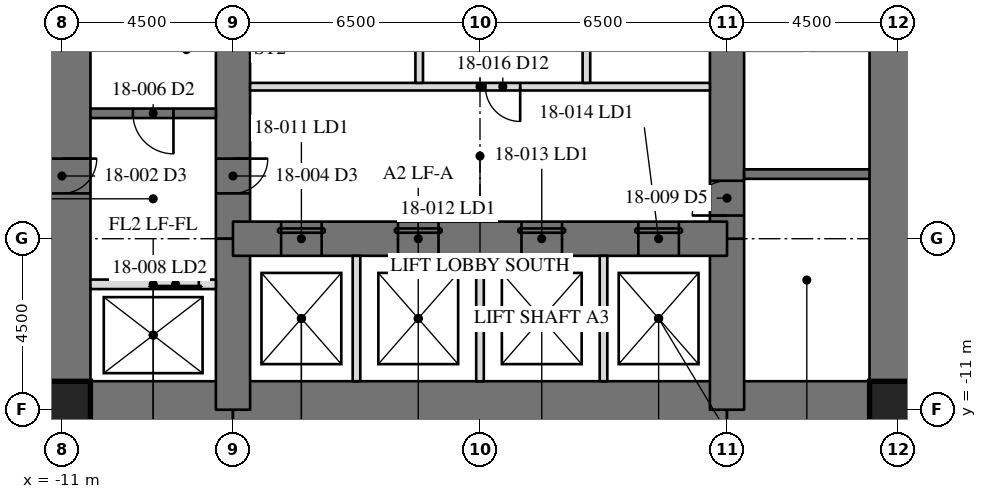
"""IFC4 building model, lengths in metres.
Left out: names, types, materials, properties, quantities, classifications, styles, units other than length and angle.
Written with IfcOpenShell. Run it as: python <this file> out.ifc"""

import sys

from ifc_helpers import new_model, si_unit, direction, frame, frame_2d, origin, origin_2d, place, context, subcontext, project, spatial, rectangle, hollow_rectangle, extrude, element, fill, save


model = new_model("IFC4")
c1 = context("Model", 3, precision=1e-05, world=origin(), true_north=direction((0.0, 1.0)))
c2 = subcontext(c1, "Body", "Model", "MODEL_VIEW")
j1 = project(units=[si_unit("LENGTHUNIT", "METRE"), si_unit("PLANEANGLEUNIT", "RADIAN")], contexts=[c1])
p1 = place(None, origin())
s1 = spatial("IfcSite", under=j1, at=p1, CompositionType="ELEMENT")
p2 = place(p1, origin())
s2 = spatial("IfcBuilding", under=s1, at=p2, CompositionType="ELEMENT")
p3 = place(p2, frame((0.0, 0.0, 77.5)))
s3 = spatial("IfcBuildingStorey", under=s2, at=p3, CompositionType="ELEMENT", Elevation=77.5)
p4 = place(p3, frame((11.0, -11.0, 0.0), z_axis=(0.0, 0.0, 1.0), x_axis=(0.0, 1.0, 0.0)))
e1 = element("IfcWall", 1, at=p4, inside=s3, PredefinedType="SHEAR", context=c2, shape_type="SweptSolid", body=[
    extrude(rectangle(XDim=22.0, YDim=1.5, at=frame_2d((11.0, 0.0))), origin(), (0.0, 0.0, 1.0), 4.1),
])
p5 = place(p4, frame((15.393, 0.0, 0.0)))
e2 = element("IfcOpeningElement", 2, at=p5, cuts=e1, PredefinedType="OPENING", context=c2, shape_type="SweptSolid", body=[
    extrude(rectangle(XDim=0.915, YDim=2.134, at=frame_2d((0.458, 1.067))), frame((0.0, 0.76, 0.0), z_axis=(0.0, -1.0, 0.0), x_axis=(1.0, 0.0, 0.0)), (0.0, 0.0, 1.0), 1.52),
])
p6 = place(p3, frame((-11.0, 11.0, 0.0), z_axis=(0.0, 0.0, 1.0), x_axis=(0.0, -1.0, 0.0)))
e3 = element("IfcWall", 3, at=p6, inside=s3, PredefinedType="SHEAR", context=c2, shape_type="SweptSolid", body=[
    extrude(rectangle(XDim=22.0, YDim=1.5, at=frame_2d((11.0, 0.0))), origin(), (0.0, 0.0, 1.0), 4.1),
])
p7 = place(p6, frame((15.393, 0.0, 0.0)))
e4 = element("IfcOpeningElement", 4, at=p7, cuts=e3, PredefinedType="OPENING", context=c2, shape_type="SweptSolid", body=[
    extrude(rectangle(XDim=0.915, YDim=2.134, at=frame_2d((0.458, 1.067))), frame((0.0, 0.76, 0.0), z_axis=(0.0, -1.0, 0.0), x_axis=(1.0, 0.0, 0.0)), (0.0, 0.0, 1.0), 1.52),
])
p8 = place(p3, frame((-11.0, -11.0, 0.0), z_axis=(0.0, 0.0, 1.0), x_axis=(1.0, 0.0, 0.0)))
e5 = element("IfcWall", 5, at=p8, inside=s3, PredefinedType="SHEAR", context=c2, shape_type="SweptSolid", body=[
    extrude(rectangle(XDim=4.5, YDim=1.5, at=frame_2d((2.25, 0.0))), origin(), (0.0, 0.0, 1.0), 4.1),
])
p9 = place(p3, frame((-6.5, -11.0, 0.0), z_axis=(0.0, 0.0, 1.0), x_axis=(1.0, 0.0, 0.0)))
e6 = element("IfcWall", 6, at=p9, inside=s3, PredefinedType="SHEAR", context=c2, shape_type="SweptSolid", body=[
    extrude(rectangle(XDim=13.0, YDim=1.5, at=frame_2d((6.5, 0.0))), origin(), (0.0, 0.0, 1.0), 4.1),
])
p10 = place(p3, frame((6.5, -11.0, 0.0), z_axis=(0.0, 0.0, 1.0), x_axis=(1.0, 0.0, 0.0)))
e7 = element("IfcWall", 7, at=p10, inside=s3, PredefinedType="SHEAR", context=c2, shape_type="SweptSolid", body=[
    extrude(rectangle(XDim=4.5, YDim=1.5, at=frame_2d((2.25, 0.0))), origin(), (0.0, 0.0, 1.0), 4.1),
])
p11 = place(p3, frame((6.5, -11.0, 0.0), z_axis=(0.0, 0.0, 1.0), x_axis=(0.0, 1.0, 0.0)))
e8 = element("IfcWall", 8, at=p11, inside=s3, PredefinedType="SHEAR", context=c2, shape_type="SweptSolid", body=[
    extrude(rectangle(XDim=4.5, YDim=0.9, at=frame_2d((2.25, 0.0))), origin(), (0.0, 0.0, 1.0), 4.1),
])
p12 = place(p3, frame((6.5, -6.5, 0.0), z_axis=(0.0, 0.0, 1.0), x_axis=(0.0, 1.0, 0.0)))
e9 = element("IfcWall", 9, at=p12, inside=s3, PredefinedType="SHEAR", context=c2, shape_type="SweptSolid", body=[
    extrude(rectangle(XDim=13.0, YDim=0.9, at=frame_2d((6.5, 0.0))), origin(), (0.0, 0.0, 1.0), 4.1),
])
p13 = place(p12, frame((10.893, 0.0, 0.0)))
e10 = element("IfcOpeningElement", 10, at=p13, cuts=e9, PredefinedType="OPENING", context=c2, shape_type="SweptSolid", body=[
    extrude(rectangle(XDim=0.915, YDim=2.134, at=frame_2d((0.458, 1.067))), frame((0.0, 0.46, 0.0), z_axis=(0.0, -1.0, 0.0), x_axis=(1.0, 0.0, 0.0)), (0.0, 0.0, 1.0), 0.92),
])
p14 = place(p12, frame((0.61, 0.0, 0.0)))
e11 = element("IfcOpeningElement", 11, at=p14, cuts=e9, PredefinedType="OPENING", context=c2, shape_type="SweptSolid", body=[
    extrude(rectangle(XDim=0.915, YDim=2.134, at=frame_2d((0.458, 1.067))), frame((0.0, 0.46, 0.0), z_axis=(0.0, -1.0, 0.0), x_axis=(1.0, 0.0, 0.0)), (0.0, 0.0, 1.0), 0.92),
])
p15 = place(p3, frame((-6.5, 6.5, 0.0), z_axis=(0.0, 0.0, 1.0), x_axis=(0.0, -1.0, 0.0)))
e12 = element("IfcWall", 12, at=p15, inside=s3, PredefinedType="SHEAR", context=c2, shape_type="SweptSolid", body=[
    extrude(rectangle(XDim=13.0, YDim=0.9, at=frame_2d((6.5, 0.0))), origin(), (0.0, 0.0, 1.0), 4.1),
])
p16 = place(p15, frame((10.893, 0.0, 0.0)))
e13 = element("IfcOpeningElement", 13, at=p16, cuts=e12, PredefinedType="OPENING", context=c2, shape_type="SweptSolid", body=[
    extrude(rectangle(XDim=0.915, YDim=2.134, at=frame_2d((0.458, 1.067))), frame((0.0, 0.46, 0.0), z_axis=(0.0, -1.0, 0.0), x_axis=(1.0, 0.0, 0.0)), (0.0, 0.0, 1.0), 0.92),
])
p17 = place(p15, frame((0.61, 0.0, 0.0)))
e14 = element("IfcOpeningElement", 14, at=p17, cuts=e12, PredefinedType="OPENING", context=c2, shape_type="SweptSolid", body=[
    extrude(rectangle(XDim=0.915, YDim=2.134, at=frame_2d((0.458, 1.067))), frame((0.0, 0.46, 0.0), z_axis=(0.0, -1.0, 0.0), x_axis=(1.0, 0.0, 0.0)), (0.0, 0.0, 1.0), 0.92),
])
p18 = place(p3, frame((-6.5, -6.5, 0.0), z_axis=(0.0, 0.0, 1.0), x_axis=(0.0, -1.0, 0.0)))
e15 = element("IfcWall", 15, at=p18, inside=s3, PredefinedType="SHEAR", context=c2, shape_type="SweptSolid", body=[
    extrude(rectangle(XDim=4.5, YDim=0.9, at=frame_2d((2.25, 0.0))), origin(), (0.0, 0.0, 1.0), 4.1),
])
p19 = place(p3, frame((-6.5, -6.5, 0.0), z_axis=(0.0, 0.0, 1.0), x_axis=(1.0, 0.0, 0.0)))
e16 = element("IfcWall", 16, at=p19, inside=s3, PredefinedType="SHEAR", context=c2, shape_type="SweptSolid", body=[
    extrude(rectangle(XDim=13.0, YDim=0.9, at=frame_2d((6.5, 0.0))), origin(), (0.0, 0.0, 1.0), 4.1),
])
p20 = place(p19, frame((1.267, 0.0, 0.0)))
e17 = element("IfcOpeningElement", 17, at=p20, cuts=e16, PredefinedType="OPENING", context=c2, shape_type="SweptSolid", body=[
    extrude(rectangle(XDim=1.067, YDim=2.134, at=frame_2d((0.533, 1.067))), frame((0.0, 0.46, 0.0), z_axis=(0.0, -1.0, 0.0), x_axis=(1.0, 0.0, 0.0)), (0.0, 0.0, 1.0), 0.92),
])
p21 = place(p19, frame((4.342, 0.0, 0.0)))
e18 = element("IfcOpeningElement", 18, at=p21, cuts=e16, PredefinedType="OPENING", context=c2, shape_type="SweptSolid", body=[
    extrude(rectangle(XDim=1.067, YDim=2.134, at=frame_2d((0.533, 1.067))), frame((0.0, 0.46, 0.0), z_axis=(0.0, -1.0, 0.0), x_axis=(1.0, 0.0, 0.0)), (0.0, 0.0, 1.0), 0.92),
])
p22 = place(p19, frame((7.592, 0.0, 0.0)))
e19 = element("IfcOpeningElement", 19, at=p22, cuts=e16, PredefinedType="OPENING", context=c2, shape_type="SweptSolid", body=[
    extrude(rectangle(XDim=1.067, YDim=2.134, at=frame_2d((0.533, 1.067))), frame((0.0, 0.46, 0.0), z_axis=(0.0, -1.0, 0.0), x_axis=(1.0, 0.0, 0.0)), (0.0, 0.0, 1.0), 0.92),
])
p23 = place(p19, frame((10.667, 0.0, 0.0)))
e20 = element("IfcOpeningElement", 20, at=p23, cuts=e16, PredefinedType="OPENING", context=c2, shape_type="SweptSolid", body=[
    extrude(rectangle(XDim=1.067, YDim=2.134, at=frame_2d((0.533, 1.067))), frame((0.0, 0.46, 0.0), z_axis=(0.0, -1.0, 0.0), x_axis=(1.0, 0.0, 0.0)), (0.0, 0.0, 1.0), 0.92),
])
for number, where, z_axis, x_axis in (
    (21, (-11.0, -11.0, 0.0), (0.0, 0.0, 1.0), (1.0, 0.0, 0.0)),
    (22, (11.0, -11.0, 0.0), (0.0, 0.0, 1.0), (1.0, 0.0, 0.0)),
):
    element("IfcColumn", number, at=place(p3, frame(where, z_axis=z_axis, x_axis=x_axis)), inside=s3, PredefinedType="COLUMN", context=c2, shape_type="SweptSolid", body=[
        extrude(hollow_rectangle(XDim=1.499, YDim=1.499, WallThickness=0.102, at=origin_2d()), origin(), (0.0, 0.0, 1.0), 4.1),
    ])
p24 = place(p3, frame((6.95, -4.8, 0.0), z_axis=(0.0, 0.0, 1.0), x_axis=(1.0, 0.0, 0.0)))
e23 = element("IfcWall", 23, at=p24, inside=s3, PredefinedType="SOLIDWALL", context=c2, shape_type="SweptSolid", body=[
    extrude(rectangle(XDim=3.3, YDim=0.25, at=frame_2d((1.65, 0.0))), origin(), (0.0, 0.0, 1.0), 3.91),
])
p25 = place(p3, frame((-6.95, -3.2, 0.0), z_axis=(0.0, 0.0, 1.0), x_axis=(-1.0, 0.0, 0.0)))
e24 = element("IfcWall", 24, at=p25, inside=s3, PredefinedType="SOLIDWALL", context=c2, shape_type="SweptSolid", body=[
    extrude(rectangle(XDim=3.3, YDim=0.25, at=frame_2d((1.65, 0.0))), origin(), (0.0, 0.0, 1.0), 3.91),
])
p26 = place(p25, frame((1.116, 0.0, 0.0)))
e25 = element("IfcOpeningElement", 25, at=p26, cuts=e24, PredefinedType="OPENING", context=c2, shape_type="SweptSolid", body=[
    extrude(rectangle(XDim=1.067, YDim=2.134, at=frame_2d((0.533, 1.067))), frame((0.0, 0.135, 0.0), z_axis=(0.0, -1.0, 0.0), x_axis=(1.0, 0.0, 0.0)), (0.0, 0.0, 1.0), 0.27),
])
p27 = place(p3, frame((-6.95, -7.7, 0.0), z_axis=(0.0, 0.0, 1.0), x_axis=(-1.0, 0.0, 0.0)))
e26 = element("IfcWall", 26, at=p27, inside=s3, PredefinedType="PARTITIONING", context=c2, shape_type="SweptSolid", body=[
    extrude(rectangle(XDim=3.3, YDim=0.25, at=frame_2d((1.65, 0.0))), origin(), (0.0, 0.0, 1.0), 3.91),
])
p28 = place(p27, frame((0.45, 0.0, 0.0)))
e27 = element("IfcOpeningElement", 27, at=p28, cuts=e26, PredefinedType="OPENING", context=c2, shape_type="SweptSolid", body=[
    extrude(rectangle(XDim=1.219, YDim=2.134, at=frame_2d((0.609, 1.067))), frame((0.0, 0.135, 0.0), z_axis=(0.0, -1.0, 0.0), x_axis=(1.0, 0.0, 0.0)), (0.0, 0.0, 1.0), 0.27),
])
p29 = place(p3, frame((6.05, -2.5, 0.0), z_axis=(0.0, 0.0, 1.0), x_axis=(-1.0, 0.0, 0.0)))
e28 = element("IfcWall", 28, at=p29, inside=s3, PredefinedType="PARTITIONING", context=c2, shape_type="SweptSolid", body=[
    extrude(rectangle(XDim=12.1, YDim=0.2, at=frame_2d((6.05, 0.0))), origin(), (0.0, 0.0, 1.0), 3.91),
])
p30 = place(p29, frame((4.992, 0.0, 0.0)))
e29 = element("IfcOpeningElement", 29, at=p30, cuts=e28, PredefinedType="OPENING", context=c2, shape_type="SweptSolid", body=[
    extrude(rectangle(XDim=0.915, YDim=2.134, at=frame_2d((0.458, 1.067))), frame((0.0, 0.11, 0.0), z_axis=(0.0, -1.0, 0.0), x_axis=(1.0, 0.0, 0.0)), (0.0, 0.0, 1.0), 0.22),
])
for number, where, z_axis, x_axis in (
    (30, (-3.25, -10.25, 0.0), (0.0, 0.0, 1.0), (0.0, 1.0, 0.0)),
    (31, (0.0, -10.25, 0.0), (0.0, 0.0, 1.0), (0.0, 1.0, 0.0)),
    (32, (3.25, -10.25, 0.0), (0.0, 0.0, 1.0), (0.0, 1.0, 0.0)),
):
    element("IfcWall", number, at=place(p3, frame(where, z_axis=z_axis, x_axis=x_axis)), inside=s3, PredefinedType="PARTITIONING", context=c2, shape_type="SweptSolid", body=[
        extrude(rectangle(XDim=3.3, YDim=0.2, at=frame_2d((1.65, 0.0))), origin(), (0.0, 0.0, 1.0), 3.91),
    ])
for number, where, z_axis, x_axis in (
    (33, (-1.6, -2.4, 0.0), (0.0, 0.0, 1.0), (0.0, 1.0, 0.0)),
    (34, (2.8, -2.4, 0.0), (0.0, 0.0, 1.0), (0.0, 1.0, 0.0)),
):
    element("IfcWall", number, at=place(p3, frame(where, z_axis=z_axis, x_axis=x_axis)), inside=s3, PredefinedType="PARTITIONING", context=c2, shape_type="SweptSolid", body=[
        extrude(rectangle(XDim=4.8, YDim=0.2, at=frame_2d((2.4, 0.0))), origin(), (0.0, 0.0, 1.0), 3.91),
    ])
p31 = place(p16, origin())
e35 = element("IfcDoor", 35, at=p31, inside=s3, OperationType="SINGLE_SWING_RIGHT", PredefinedType="DOOR", context=c2, shape_type="SweptSolid", body=[
    extrude(rectangle(XDim=0.915, YDim=2.134, at=frame_2d((0.458, 1.067))), frame((0.0, -0.375, 0.0), z_axis=(0.0, -1.0, 0.0), x_axis=(1.0, 0.0, 0.0)), (0.0, 0.0, 1.0), 0.05),
])
fill(e13, e35)
p32 = place(p26, origin())
e36 = element("IfcDoor", 36, at=p32, inside=s3, OperationType="SINGLE_SWING_LEFT", PredefinedType="DOOR", context=c2, shape_type="SweptSolid", body=[
    extrude(rectangle(XDim=1.067, YDim=2.134, at=frame_2d((0.533, 1.067))), frame((0.0, 0.025, 0.0), z_axis=(0.0, -1.0, 0.0), x_axis=(1.0, 0.0, 0.0)), (0.0, 0.0, 1.0), 0.05),
])
fill(e25, e36)
p33 = place(p28, origin())
e37 = element("IfcDoor", 37, at=p33, inside=s3, OperationType="SLIDING_TO_LEFT", PredefinedType="DOOR", context=c2, shape_type="SweptSolid", body=[
    extrude(rectangle(XDim=1.219, YDim=2.134, at=frame_2d((0.609, 1.067))), frame((0.0, 0.025, 0.0), z_axis=(0.0, -1.0, 0.0), x_axis=(1.0, 0.0, 0.0)), (0.0, 0.0, 1.0), 0.05),
])
fill(e27, e37)
p34 = place(p14, origin())
e38 = element("IfcDoor", 38, at=p34, inside=s3, OperationType="SINGLE_SWING_RIGHT", PredefinedType="DOOR", context=c2, shape_type="SweptSolid", body=[
    extrude(rectangle(XDim=0.915, YDim=2.134, at=frame_2d((0.458, 1.067))), frame((0.0, -0.375, 0.0), z_axis=(0.0, -1.0, 0.0), x_axis=(1.0, 0.0, 0.0)), (0.0, 0.0, 1.0), 0.05),
])
fill(e11, e38)
p35 = place(p20, origin())
e39 = element("IfcDoor", 39, at=p35, inside=s3, OperationType="SLIDING_TO_LEFT", PredefinedType="DOOR", context=c2, shape_type="SweptSolid", body=[
    extrude(rectangle(XDim=1.067, YDim=2.134, at=frame_2d((0.533, 1.067))), frame((0.0, -0.375, 0.0), z_axis=(0.0, -1.0, 0.0), x_axis=(1.0, 0.0, 0.0)), (0.0, 0.0, 1.0), 0.05),
])
fill(e17, e39)
p36 = place(p21, origin())
e40 = element("IfcDoor", 40, at=p36, inside=s3, OperationType="SLIDING_TO_LEFT", PredefinedType="DOOR", context=c2, shape_type="SweptSolid", body=[
    extrude(rectangle(XDim=1.067, YDim=2.134, at=frame_2d((0.533, 1.067))), frame((0.0, -0.375, 0.0), z_axis=(0.0, -1.0, 0.0), x_axis=(1.0, 0.0, 0.0)), (0.0, 0.0, 1.0), 0.05),
])
fill(e18, e40)
p37 = place(p22, origin())
e41 = element("IfcDoor", 41, at=p37, inside=s3, OperationType="SLIDING_TO_LEFT", PredefinedType="DOOR", context=c2, shape_type="SweptSolid", body=[
    extrude(rectangle(XDim=1.067, YDim=2.134, at=frame_2d((0.533, 1.067))), frame((0.0, -0.375, 0.0), z_axis=(0.0, -1.0, 0.0), x_axis=(1.0, 0.0, 0.0)), (0.0, 0.0, 1.0), 0.05),
])
fill(e19, e41)
p38 = place(p23, origin())
e42 = element("IfcDoor", 42, at=p38, inside=s3, OperationType="SLIDING_TO_LEFT", PredefinedType="DOOR", context=c2, shape_type="SweptSolid", body=[
    extrude(rectangle(XDim=1.067, YDim=2.134, at=frame_2d((0.533, 1.067))), frame((0.0, -0.375, 0.0), z_axis=(0.0, -1.0, 0.0), x_axis=(1.0, 0.0, 0.0)), (0.0, 0.0, 1.0), 0.05),
])
fill(e20, e42)
p39 = place(p30, origin())
e43 = element("IfcDoor", 43, at=p39, inside=s3, OperationType="SINGLE_SWING_LEFT", PredefinedType="DOOR", context=c2, shape_type="SweptSolid", body=[
    extrude(rectangle(XDim=0.915, YDim=2.134, at=frame_2d((0.458, 1.067))), frame((0.0, 0.025, 0.0), z_axis=(0.0, -1.0, 0.0), x_axis=(1.0, 0.0, 0.0)), (0.0, 0.0, 1.0), 0.05),
])
fill(e29, e43)
save(model, sys.argv[1])
